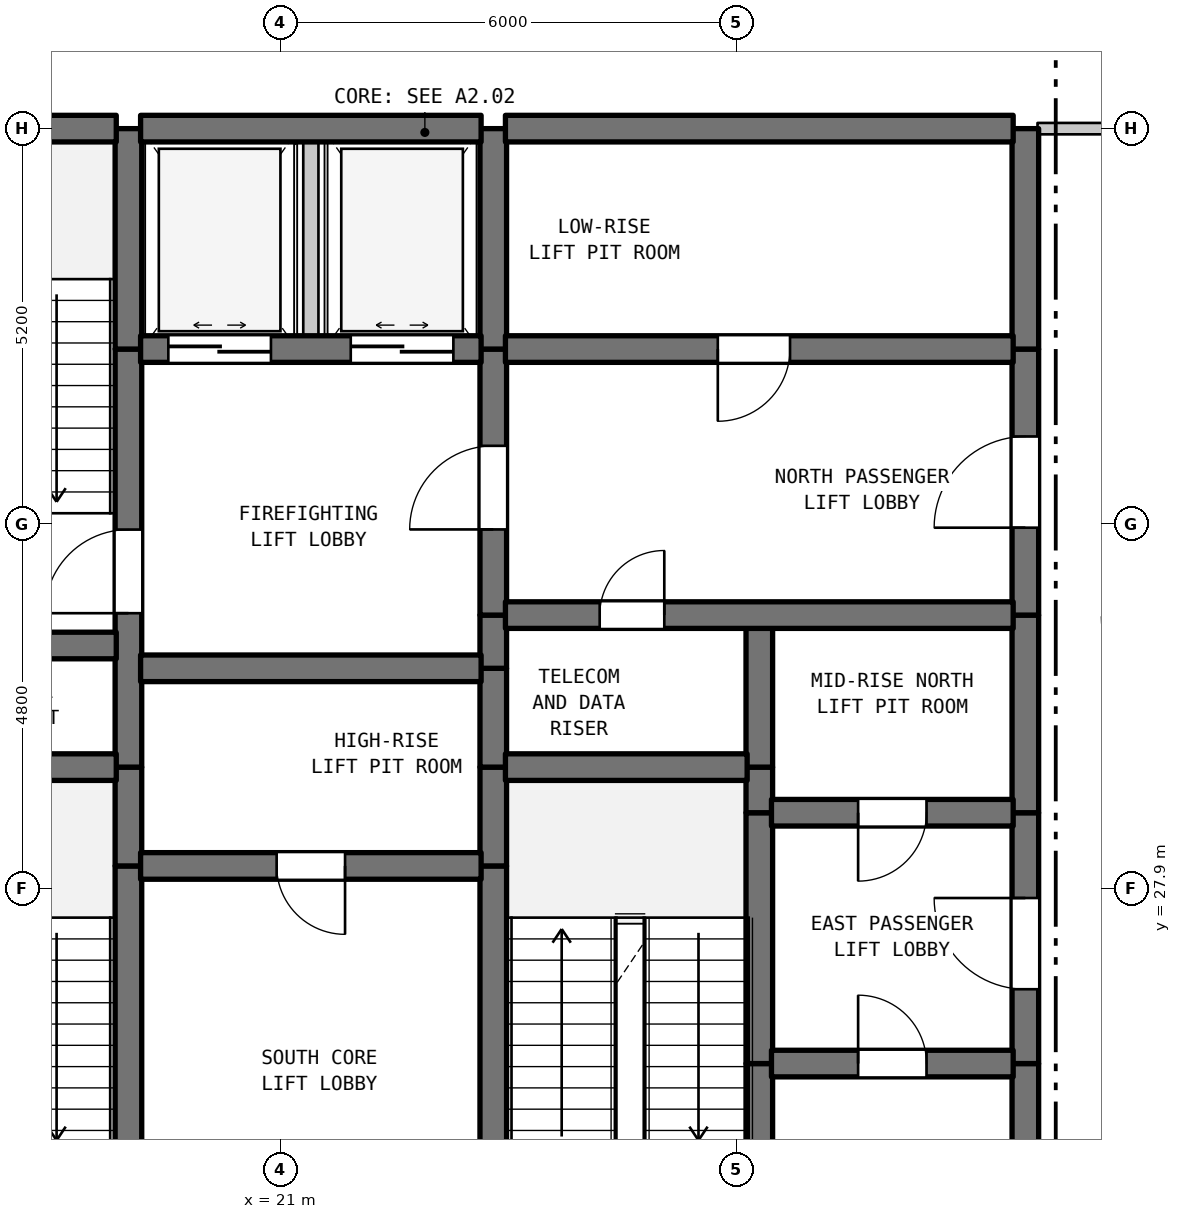
"""IFC4 building model, lengths in metres.
Left out: names, types, materials, properties, quantities, classifications, styles, units other than length and angle.
Written with IfcOpenShell. Run it as: python <this file> out.ifc"""

import sys

from ifc_helpers import new_model, si_unit, direction, frame, frame_2d, origin, place, context, subcontext, project, spatial, rectangle, extrude, element, fill, save


model = new_model("IFC4")
c1 = context("Model", 3, precision=1e-05, world=origin(), true_north=direction((0.0, 1.0)))
c2 = subcontext(c1, "Body", "Model", "MODEL_VIEW")
j1 = project(units=[si_unit("LENGTHUNIT", "METRE"), si_unit("PLANEANGLEUNIT", "RADIAN")], contexts=[c1])
p1 = place(None, origin())
s1 = spatial("IfcSite", under=j1, at=p1, CompositionType="ELEMENT")
p2 = place(p1, origin())
s2 = spatial("IfcBuilding", under=s1, at=p2, CompositionType="ELEMENT")
p3 = place(p2, frame((0.0, 0.0, -4.5)))
s3 = spatial("IfcBuildingStorey", under=s2, at=p3, CompositionType="ELEMENT", Elevation=-4.5)
p4 = place(p3, frame((19.0, 22.7, 0.0), z_axis=(0.0, 0.0, 1.0), x_axis=(0.0, 1.0, 0.0)))
e1 = element("IfcWall", 1, at=p4, inside=s3, PredefinedType="SHEAR", context=c2, shape_type="SweptSolid", body=[
    extrude(rectangle(XDim=5.5, YDim=0.35, at=frame_2d((2.75, 0.0))), origin(), (0.0, 0.0, 1.0), 4.1),
])
p5 = place(p4, frame((0.631, 0.0, 0.0)))
e2 = element("IfcOpeningElement", 2, at=p5, cuts=e1, PredefinedType="OPENING", context=c2, shape_type="SweptSolid", body=[
    extrude(rectangle(XDim=1.1, YDim=2.15, at=frame_2d((0.55, 1.075))), frame((0.0, 0.185, 0.0), z_axis=(0.0, -1.0, 0.0), x_axis=(1.0, 0.0, 0.0)), (0.0, 0.0, 1.0), 0.37),
])
p6 = place(p3, frame((19.0, 28.2, 0.0), z_axis=(0.0, 0.0, 1.0), x_axis=(0.0, 1.0, 0.0)))
e3 = element("IfcWall", 3, at=p6, inside=s3, PredefinedType="SHEAR", context=c2, shape_type="SweptSolid", body=[
    extrude(rectangle(XDim=1.3, YDim=0.35, at=frame_2d((0.65, 0.0))), origin(), (0.0, 0.0, 1.0), 4.1),
])
p7 = place(p3, frame((19.0, 29.5, 0.0), z_axis=(0.0, 0.0, 1.0), x_axis=(0.0, 1.0, 0.0)))
e4 = element("IfcWall", 4, at=p7, inside=s3, PredefinedType="SHEAR", context=c2, shape_type="SweptSolid", body=[
    extrude(rectangle(XDim=5.5, YDim=0.35, at=frame_2d((2.75, 0.0))), origin(), (0.0, 0.0, 1.0), 4.1),
])
p8 = place(p7, frame((2.025, 0.0, 0.0)))
e5 = element("IfcOpeningElement", 5, at=p8, cuts=e4, PredefinedType="OPENING", context=c2, shape_type="SweptSolid", body=[
    extrude(rectangle(XDim=1.1, YDim=2.15, at=frame_2d((0.55, 1.075))), frame((0.0, 0.185, 0.0), z_axis=(0.0, -1.0, 0.0), x_axis=(1.0, 0.0, 0.0)), (0.0, 0.0, 1.0), 0.37),
])
p9 = place(p3, frame((19.0, 35.0, 0.0), z_axis=(0.0, 0.0, 1.0), x_axis=(0.0, 1.0, 0.0)))
e6 = element("IfcWall", 6, at=p9, inside=s3, PredefinedType="SHEAR", context=c2, shape_type="SweptSolid", body=[
    extrude(rectangle(XDim=2.9, YDim=0.35, at=frame_2d((1.45, 0.0))), origin(), (0.0, 0.0, 1.0), 4.1),
])
p10 = place(p3, frame((21.4, 35.0, 0.0), z_axis=(0.0, 0.0, 1.0), x_axis=(0.0, 1.0, 0.0)))
e7 = element("IfcWall", 7, at=p10, inside=s3, PredefinedType="STANDARD", context=c2, shape_type="SweptSolid", body=[
    extrude(rectangle(XDim=2.9, YDim=0.2, at=frame_2d((1.45, 0.0))), origin(), (0.0, 0.0, 1.0), 4.1),
])
p11 = place(p3, frame((23.8, 22.7, 0.0), z_axis=(0.0, 0.0, 1.0), x_axis=(0.0, 1.0, 0.0)))
e8 = element("IfcWall", 8, at=p11, inside=s3, PredefinedType="SHEAR", context=c2, shape_type="SweptSolid", body=[
    extrude(rectangle(XDim=5.5, YDim=0.35, at=frame_2d((2.75, 0.0))), origin(), (0.0, 0.0, 1.0), 4.1),
])
p12 = place(p11, frame((0.235, 0.0, 0.0)))
e9 = element("IfcOpeningElement", 9, at=p12, cuts=e8, PredefinedType="OPENING", context=c2, shape_type="SweptSolid", body=[
    extrude(rectangle(XDim=1.1, YDim=2.15, at=frame_2d((0.55, 1.075))), frame((0.0, 0.185, 0.0), z_axis=(0.0, -1.0, 0.0), x_axis=(1.0, 0.0, 0.0)), (0.0, 0.0, 1.0), 0.37),
])
for number, where, z_axis, x_axis in (
    (10, (23.8, 28.2, 0.0), (0.0, 0.0, 1.0), (0.0, 1.0, 0.0)),
    (11, (23.8, 29.5, 0.0), (0.0, 0.0, 1.0), (0.0, 1.0, 0.0)),
):
    element("IfcWall", number, at=place(p3, frame(where, z_axis=z_axis, x_axis=x_axis)), inside=s3, PredefinedType="SHEAR", context=c2, shape_type="SweptSolid", body=[
        extrude(rectangle(XDim=1.3, YDim=0.35, at=frame_2d((0.65, 0.0))), origin(), (0.0, 0.0, 1.0), 4.1),
    ])
p13 = place(p3, frame((23.8, 30.8, 0.0), z_axis=(0.0, 0.0, 1.0), x_axis=(0.0, 1.0, 0.0)))
e12 = element("IfcWall", 12, at=p13, inside=s3, PredefinedType="SHEAR", context=c2, shape_type="SweptSolid", body=[
    extrude(rectangle(XDim=0.7, YDim=0.35, at=frame_2d((0.35, 0.0))), origin(), (0.0, 0.0, 1.0), 4.1),
])
p14 = place(p3, frame((23.8, 31.5, 0.0), z_axis=(0.0, 0.0, 1.0), x_axis=(0.0, 1.0, 0.0)))
e13 = element("IfcWall", 13, at=p14, inside=s3, PredefinedType="SHEAR", context=c2, shape_type="SweptSolid", body=[
    extrude(rectangle(XDim=3.5, YDim=0.35, at=frame_2d((1.75, 0.0))), origin(), (0.0, 0.0, 1.0), 4.1),
])
p15 = place(p14, frame((1.127, 0.0, 0.0)))
e14 = element("IfcOpeningElement", 14, at=p15, cuts=e13, PredefinedType="OPENING", context=c2, shape_type="SweptSolid", body=[
    extrude(rectangle(XDim=1.1, YDim=2.15, at=frame_2d((0.55, 1.075))), frame((0.0, 0.185, 0.0), z_axis=(0.0, -1.0, 0.0), x_axis=(1.0, 0.0, 0.0)), (0.0, 0.0, 1.0), 0.37),
])
p16 = place(p3, frame((23.8, 35.0, 0.0), z_axis=(0.0, 0.0, 1.0), x_axis=(0.0, 1.0, 0.0)))
e15 = element("IfcWall", 15, at=p16, inside=s3, PredefinedType="SHEAR", context=c2, shape_type="SweptSolid", body=[
    extrude(rectangle(XDim=2.9, YDim=0.35, at=frame_2d((1.45, 0.0))), origin(), (0.0, 0.0, 1.0), 4.1),
])
p17 = place(p3, frame((27.3, 22.7, 0.0), z_axis=(0.0, 0.0, 1.0), x_axis=(0.0, 1.0, 0.0)))
e16 = element("IfcWall", 16, at=p17, inside=s3, PredefinedType="SHEAR", context=c2, shape_type="SweptSolid", body=[
    extrude(rectangle(XDim=2.9, YDim=0.35, at=frame_2d((1.45, 0.0))), origin(), (0.0, 0.0, 1.0), 4.1),
])
p18 = place(p3, frame((27.3, 25.6, 0.0), z_axis=(0.0, 0.0, 1.0), x_axis=(0.0, 1.0, 0.0)))
e17 = element("IfcWall", 17, at=p18, inside=s3, PredefinedType="SHEAR", context=c2, shape_type="SweptSolid", body=[
    extrude(rectangle(XDim=3.3, YDim=0.35, at=frame_2d((1.65, 0.0))), origin(), (0.0, 0.0, 1.0), 4.1),
])
p19 = place(p3, frame((27.3, 28.9, 0.0), z_axis=(0.0, 0.0, 1.0), x_axis=(0.0, 1.0, 0.0)))
e18 = element("IfcWall", 18, at=p19, inside=s3, PredefinedType="SHEAR", context=c2, shape_type="SweptSolid", body=[
    extrude(rectangle(XDim=0.6, YDim=0.35, at=frame_2d((0.3, 0.0))), origin(), (0.0, 0.0, 1.0), 4.1),
])
p20 = place(p3, frame((27.3, 29.5, 0.0), z_axis=(0.0, 0.0, 1.0), x_axis=(0.0, 1.0, 0.0)))
e19 = element("IfcWall", 19, at=p20, inside=s3, PredefinedType="SHEAR", context=c2, shape_type="SweptSolid", body=[
    extrude(rectangle(XDim=2.0, YDim=0.35, at=frame_2d((1.0, 0.0))), origin(), (0.0, 0.0, 1.0), 4.1),
])
p21 = place(p3, frame((30.8, 22.7, 0.0), z_axis=(0.0, 0.0, 1.0), x_axis=(0.0, 1.0, 0.0)))
e20 = element("IfcWall", 20, at=p21, inside=s3, PredefinedType="SHEAR", context=c2, shape_type="SweptSolid", body=[
    extrude(rectangle(XDim=2.9, YDim=0.35, at=frame_2d((1.45, 0.0))), origin(), (0.0, 0.0, 1.0), 4.1),
])
p22 = place(p3, frame((30.8, 25.6, 0.0), z_axis=(0.0, 0.0, 1.0), x_axis=(0.0, 1.0, 0.0)))
e21 = element("IfcWall", 21, at=p22, inside=s3, PredefinedType="SHEAR", context=c2, shape_type="SweptSolid", body=[
    extrude(rectangle(XDim=3.3, YDim=0.35, at=frame_2d((1.65, 0.0))), origin(), (0.0, 0.0, 1.0), 4.1),
])
p23 = place(p22, frame((0.978, 0.0, 0.0)))
e22 = element("IfcOpeningElement", 22, at=p23, cuts=e21, PredefinedType="OPENING", context=c2, shape_type="SweptSolid", body=[
    extrude(rectangle(XDim=1.2, YDim=2.2, at=frame_2d((0.6, 1.1))), frame((0.0, 0.185, 0.0), z_axis=(0.0, -1.0, 0.0), x_axis=(1.0, 0.0, 0.0)), (0.0, 0.0, 1.0), 0.37),
])
p24 = place(p3, frame((30.8, 28.9, 0.0), z_axis=(0.0, 0.0, 1.0), x_axis=(0.0, 1.0, 0.0)))
e23 = element("IfcWall", 23, at=p24, inside=s3, PredefinedType="SHEAR", context=c2, shape_type="SweptSolid", body=[
    extrude(rectangle(XDim=2.6, YDim=0.35, at=frame_2d((1.3, 0.0))), origin(), (0.0, 0.0, 1.0), 4.1),
])
p25 = place(p3, frame((30.8, 31.5, 0.0), z_axis=(0.0, 0.0, 1.0), x_axis=(0.0, 1.0, 0.0)))
e24 = element("IfcWall", 24, at=p25, inside=s3, PredefinedType="SHEAR", context=c2, shape_type="SweptSolid", body=[
    extrude(rectangle(XDim=3.5, YDim=0.35, at=frame_2d((1.75, 0.0))), origin(), (0.0, 0.0, 1.0), 4.1),
])
p26 = place(p25, frame((1.15, 0.0, 0.0)))
e25 = element("IfcOpeningElement", 25, at=p26, cuts=e24, PredefinedType="OPENING", context=c2, shape_type="SweptSolid", body=[
    extrude(rectangle(XDim=1.2, YDim=2.2, at=frame_2d((0.6, 1.1))), frame((0.0, 0.185, 0.0), z_axis=(0.0, -1.0, 0.0), x_axis=(1.0, 0.0, 0.0)), (0.0, 0.0, 1.0), 0.37),
])
p27 = place(p3, frame((30.8, 35.0, 0.0), z_axis=(0.0, 0.0, 1.0), x_axis=(0.0, 1.0, 0.0)))
e26 = element("IfcWall", 26, at=p27, inside=s3, PredefinedType="SHEAR", context=c2, shape_type="SweptSolid", body=[
    extrude(rectangle(XDim=2.9, YDim=0.35, at=frame_2d((1.45, 0.0))), origin(), (0.0, 0.0, 1.0), 4.1),
])
p28 = place(p3, frame((27.46, 25.6, 0.0), z_axis=(0.0, 0.0, 1.0), x_axis=(1.0, 0.0, 0.0)))
e27 = element("IfcWall", 27, at=p28, inside=s3, PredefinedType="SHEAR", context=c2, shape_type="SweptSolid", body=[
    extrude(rectangle(XDim=3.18, YDim=0.35, at=frame_2d((1.59, 0.0))), origin(), (0.0, 0.0, 1.0), 4.1),
])
p29 = place(p28, frame((1.14, 0.0, 0.0)))
e28 = element("IfcOpeningElement", 28, at=p29, cuts=e27, PredefinedType="OPENING", context=c2, shape_type="SweptSolid", body=[
    extrude(rectangle(XDim=0.9, YDim=2.15, at=frame_2d((0.45, 1.075))), frame((0.0, 0.185, 0.0), z_axis=(0.0, -1.0, 0.0), x_axis=(1.0, 0.0, 0.0)), (0.0, 0.0, 1.0), 0.37),
])
p30 = place(p3, frame((19.16, 28.2, 0.0), z_axis=(0.0, 0.0, 1.0), x_axis=(1.0, 0.0, 0.0)))
e29 = element("IfcWall", 29, at=p30, inside=s3, PredefinedType="SHEAR", context=c2, shape_type="SweptSolid", body=[
    extrude(rectangle(XDim=4.48, YDim=0.35, at=frame_2d((2.24, 0.0))), origin(), (0.0, 0.0, 1.0), 4.1),
])
p31 = place(p30, frame((1.79, 0.0, 0.0)))
e30 = element("IfcOpeningElement", 30, at=p31, cuts=e29, PredefinedType="OPENING", context=c2, shape_type="SweptSolid", body=[
    extrude(rectangle(XDim=0.9, YDim=2.15, at=frame_2d((0.45, 1.075))), frame((0.0, 0.185, 0.0), z_axis=(0.0, -1.0, 0.0), x_axis=(1.0, 0.0, 0.0)), (0.0, 0.0, 1.0), 0.37),
])
p32 = place(p3, frame((27.46, 28.9, 0.0), z_axis=(0.0, 0.0, 1.0), x_axis=(1.0, 0.0, 0.0)))
e31 = element("IfcWall", 31, at=p32, inside=s3, PredefinedType="SHEAR", context=c2, shape_type="SweptSolid", body=[
    extrude(rectangle(XDim=3.18, YDim=0.35, at=frame_2d((1.59, 0.0))), origin(), (0.0, 0.0, 1.0), 4.1),
])
p33 = place(p32, frame((1.14, 0.0, 0.0)))
e32 = element("IfcOpeningElement", 32, at=p33, cuts=e31, PredefinedType="OPENING", context=c2, shape_type="SweptSolid", body=[
    extrude(rectangle(XDim=0.9, YDim=2.15, at=frame_2d((0.45, 1.075))), frame((0.0, 0.185, 0.0), z_axis=(0.0, -1.0, 0.0), x_axis=(1.0, 0.0, 0.0)), (0.0, 0.0, 1.0), 0.37),
])
p34 = place(p3, frame((15.16, 29.5, 0.0), z_axis=(0.0, 0.0, 1.0), x_axis=(1.0, 0.0, 0.0)))
e33 = element("IfcWall", 33, at=p34, inside=s3, PredefinedType="SHEAR", context=c2, shape_type="SweptSolid", body=[
    extrude(rectangle(XDim=3.68, YDim=0.35, at=frame_2d((1.84, 0.0))), origin(), (0.0, 0.0, 1.0), 4.1),
])
p35 = place(p3, frame((23.96, 29.5, 0.0), z_axis=(0.0, 0.0, 1.0), x_axis=(1.0, 0.0, 0.0)))
e34 = element("IfcWall", 34, at=p35, inside=s3, PredefinedType="SHEAR", context=c2, shape_type="SweptSolid", body=[
    extrude(rectangle(XDim=3.18, YDim=0.35, at=frame_2d((1.59, 0.0))), origin(), (0.0, 0.0, 1.0), 4.1),
])
p36 = place(p3, frame((19.16, 30.8, 0.0), z_axis=(0.0, 0.0, 1.0), x_axis=(1.0, 0.0, 0.0)))
e35 = element("IfcWall", 35, at=p36, inside=s3, PredefinedType="SHEAR", context=c2, shape_type="SweptSolid", body=[
    extrude(rectangle(XDim=4.48, YDim=0.35, at=frame_2d((2.24, 0.0))), origin(), (0.0, 0.0, 1.0), 4.1),
])
p37 = place(p3, frame((15.16, 31.1, 0.0), z_axis=(0.0, 0.0, 1.0), x_axis=(1.0, 0.0, 0.0)))
e36 = element("IfcWall", 36, at=p37, inside=s3, PredefinedType="SHEAR", context=c2, shape_type="SweptSolid", body=[
    extrude(rectangle(XDim=3.68, YDim=0.35, at=frame_2d((1.84, 0.0))), origin(), (0.0, 0.0, 1.0), 4.1),
])
p38 = place(p3, frame((23.96, 31.5, 0.0), z_axis=(0.0, 0.0, 1.0), x_axis=(1.0, 0.0, 0.0)))
e37 = element("IfcWall", 37, at=p38, inside=s3, PredefinedType="SHEAR", context=c2, shape_type="SweptSolid", body=[
    extrude(rectangle(XDim=6.68, YDim=0.35, at=frame_2d((3.34, 0.0))), origin(), (0.0, 0.0, 1.0), 4.1),
])
p39 = place(p38, frame((1.24, 0.0, 0.0)))
e38 = element("IfcOpeningElement", 38, at=p39, cuts=e37, PredefinedType="OPENING", context=c2, shape_type="SweptSolid", body=[
    extrude(rectangle(XDim=0.85, YDim=2.1, at=frame_2d((0.425, 1.05))), frame((0.0, 0.185, 0.0), z_axis=(0.0, -1.0, 0.0), x_axis=(1.0, 0.0, 0.0)), (0.0, 0.0, 1.0), 0.37),
])
p40 = place(p3, frame((19.16, 35.0, 0.0), z_axis=(0.0, 0.0, 1.0), x_axis=(1.0, 0.0, 0.0)))
e39 = element("IfcWall", 39, at=p40, inside=s3, PredefinedType="SHEAR", context=c2, shape_type="SweptSolid", body=[
    extrude(rectangle(XDim=4.48, YDim=0.35, at=frame_2d((2.24, 0.0))), origin(), (0.0, 0.0, 1.0), 4.1),
])
p41 = place(p40, frame((0.365, 0.0, 0.0)))
e40 = element("IfcOpeningElement", 40, at=p41, cuts=e39, PredefinedType="OPENING", context=c2, shape_type="SweptSolid", body=[
    extrude(rectangle(XDim=1.35, YDim=2.2, at=frame_2d((0.675, 1.1))), frame((0.0, 0.185, 0.0), z_axis=(0.0, -1.0, 0.0), x_axis=(1.0, 0.0, 0.0)), (0.0, 0.0, 1.0), 0.37),
])
p42 = place(p40, frame((2.765, 0.0, 0.0)))
e41 = element("IfcOpeningElement", 41, at=p42, cuts=e39, PredefinedType="OPENING", context=c2, shape_type="SweptSolid", body=[
    extrude(rectangle(XDim=1.35, YDim=2.2, at=frame_2d((0.675, 1.1))), frame((0.0, 0.185, 0.0), z_axis=(0.0, -1.0, 0.0), x_axis=(1.0, 0.0, 0.0)), (0.0, 0.0, 1.0), 0.37),
])
p43 = place(p3, frame((23.96, 35.0, 0.0), z_axis=(0.0, 0.0, 1.0), x_axis=(1.0, 0.0, 0.0)))
e42 = element("IfcWall", 42, at=p43, inside=s3, PredefinedType="SHEAR", context=c2, shape_type="SweptSolid", body=[
    extrude(rectangle(XDim=6.68, YDim=0.35, at=frame_2d((3.34, 0.0))), origin(), (0.0, 0.0, 1.0), 4.1),
])
p44 = place(p43, frame((2.794, 0.0, 0.0)))
e43 = element("IfcOpeningElement", 43, at=p44, cuts=e42, PredefinedType="OPENING", context=c2, shape_type="SweptSolid", body=[
    extrude(rectangle(XDim=0.95, YDim=2.15, at=frame_2d((0.475, 1.075))), frame((0.0, 0.185, 0.0), z_axis=(0.0, -1.0, 0.0), x_axis=(1.0, 0.0, 0.0)), (0.0, 0.0, 1.0), 0.37),
])
p45 = place(p3, frame((15.16, 37.9, 0.0), z_axis=(0.0, 0.0, 1.0), x_axis=(1.0, 0.0, 0.0)))
e44 = element("IfcWall", 44, at=p45, inside=s3, PredefinedType="SHEAR", context=c2, shape_type="SweptSolid", body=[
    extrude(rectangle(XDim=3.68, YDim=0.35, at=frame_2d((1.84, 0.0))), origin(), (0.0, 0.0, 1.0), 4.1),
])
p46 = place(p3, frame((19.16, 37.9, 0.0), z_axis=(0.0, 0.0, 1.0), x_axis=(1.0, 0.0, 0.0)))
e45 = element("IfcWall", 45, at=p46, inside=s3, PredefinedType="SHEAR", context=c2, shape_type="SweptSolid", body=[
    extrude(rectangle(XDim=4.48, YDim=0.35, at=frame_2d((2.24, 0.0))), origin(), (0.0, 0.0, 1.0), 4.1),
])
p47 = place(p3, frame((23.96, 37.9, 0.0), z_axis=(0.0, 0.0, 1.0), x_axis=(1.0, 0.0, 0.0)))
e46 = element("IfcWall", 46, at=p47, inside=s3, PredefinedType="SHEAR", context=c2, shape_type="SweptSolid", body=[
    extrude(rectangle(XDim=6.68, YDim=0.35, at=frame_2d((3.34, 0.0))), origin(), (0.0, 0.0, 1.0), 4.1),
])
p48 = place(p3, frame((30.96, 37.9, 0.0), z_axis=(0.0, 0.0, 1.0), x_axis=(1.0, 0.0, 0.0)))
e47 = element("IfcWall", 47, at=p48, inside=s3, PredefinedType="STANDARD", context=c2, shape_type="SweptSolid", body=[
    extrude(rectangle(XDim=1.98, YDim=0.15, at=frame_2d((0.99, 0.0))), origin(), (0.0, 0.0, 1.0), 3.2),
])
p49 = place(p8, origin())
e48 = element("IfcDoor", 48, at=p49, inside=s3, OperationType="SINGLE_SWING_LEFT", PredefinedType="DOOR", context=c2, shape_type="SweptSolid", body=[
    extrude(rectangle(XDim=1.1, YDim=2.15, at=frame_2d((0.55, 1.075))), frame((0.0, 0.025, 0.0), z_axis=(0.0, -1.0, 0.0), x_axis=(1.0, 0.0, 0.0)), (0.0, 0.0, 1.0), 0.05),
])
fill(e5, e48)
p50 = place(p15, origin())
e49 = element("IfcDoor", 49, at=p50, inside=s3, OperationType="SINGLE_SWING_LEFT", PredefinedType="DOOR", context=c2, shape_type="SweptSolid", body=[
    extrude(rectangle(XDim=1.1, YDim=2.15, at=frame_2d((0.55, 1.075))), frame((0.0, 0.025, 0.0), z_axis=(0.0, -1.0, 0.0), x_axis=(1.0, 0.0, 0.0)), (0.0, 0.0, 1.0), 0.05),
])
fill(e14, e49)
p51 = place(p23, origin())
e50 = element("IfcDoor", 50, at=p51, inside=s3, OperationType="SINGLE_SWING_RIGHT", PredefinedType="DOOR", context=c2, shape_type="SweptSolid", body=[
    extrude(rectangle(XDim=1.2, YDim=2.2, at=frame_2d((0.6, 1.1))), frame((0.0, 0.025, 0.0), z_axis=(0.0, -1.0, 0.0), x_axis=(1.0, 0.0, 0.0)), (0.0, 0.0, 1.0), 0.05),
])
fill(e22, e50)
p52 = place(p26, origin())
e51 = element("IfcDoor", 51, at=p52, inside=s3, OperationType="SINGLE_SWING_LEFT", PredefinedType="DOOR", context=c2, shape_type="SweptSolid", body=[
    extrude(rectangle(XDim=1.2, YDim=2.2, at=frame_2d((0.6, 1.1))), frame((0.0, 0.025, 0.0), z_axis=(0.0, -1.0, 0.0), x_axis=(1.0, 0.0, 0.0)), (0.0, 0.0, 1.0), 0.05),
])
fill(e25, e51)
p53 = place(p29, origin())
e52 = element("IfcDoor", 52, at=p53, inside=s3, OperationType="SINGLE_SWING_LEFT", PredefinedType="DOOR", context=c2, shape_type="SweptSolid", body=[
    extrude(rectangle(XDim=0.9, YDim=2.15, at=frame_2d((0.45, 1.075))), frame((0.0, 0.025, 0.0), z_axis=(0.0, -1.0, 0.0), x_axis=(1.0, 0.0, 0.0)), (0.0, 0.0, 1.0), 0.05),
])
fill(e28, e52)
p54 = place(p31, frame((0.9, 0.0, 0.0), z_axis=(0.0, 0.0, 1.0), x_axis=(-1.0, 0.0, 0.0)))
e53 = element("IfcDoor", 53, at=p54, inside=s3, OperationType="SINGLE_SWING_RIGHT", PredefinedType="DOOR", context=c2, shape_type="SweptSolid", body=[
    extrude(rectangle(XDim=0.9, YDim=2.15, at=frame_2d((0.45, 1.075))), frame((0.0, 0.025, 0.0), z_axis=(0.0, -1.0, 0.0), x_axis=(1.0, 0.0, 0.0)), (0.0, 0.0, 1.0), 0.05),
])
fill(e30, e53)
p55 = place(p33, frame((0.9, 0.0, 0.0), z_axis=(0.0, 0.0, 1.0), x_axis=(-1.0, 0.0, 0.0)))
e54 = element("IfcDoor", 54, at=p55, inside=s3, OperationType="SINGLE_SWING_LEFT", PredefinedType="DOOR", context=c2, shape_type="SweptSolid", body=[
    extrude(rectangle(XDim=0.9, YDim=2.15, at=frame_2d((0.45, 1.075))), frame((0.0, 0.025, 0.0), z_axis=(0.0, -1.0, 0.0), x_axis=(1.0, 0.0, 0.0)), (0.0, 0.0, 1.0), 0.05),
])
fill(e32, e54)
p56 = place(p39, origin())
e55 = element("IfcDoor", 55, at=p56, inside=s3, OperationType="SINGLE_SWING_RIGHT", PredefinedType="DOOR", context=c2, shape_type="SweptSolid", body=[
    extrude(rectangle(XDim=0.85, YDim=2.1, at=frame_2d((0.425, 1.05))), frame((0.0, 0.025, 0.0), z_axis=(0.0, -1.0, 0.0), x_axis=(1.0, 0.0, 0.0)), (0.0, 0.0, 1.0), 0.05),
])
fill(e38, e55)
p57 = place(p41, origin())
e56 = element("IfcDoor", 56, at=p57, inside=s3, OperationType="DOUBLE_DOOR_SLIDING", PredefinedType="DOOR", context=c2, shape_type="SweptSolid", body=[
    extrude(rectangle(XDim=1.35, YDim=2.2, at=frame_2d((0.675, 1.1))), frame((0.0, 0.025, 0.0), z_axis=(0.0, -1.0, 0.0), x_axis=(1.0, 0.0, 0.0)), (0.0, 0.0, 1.0), 0.05),
])
fill(e40, e56)
p58 = place(p42, origin())
e57 = element("IfcDoor", 57, at=p58, inside=s3, OperationType="DOUBLE_DOOR_SLIDING", PredefinedType="DOOR", context=c2, shape_type="SweptSolid", body=[
    extrude(rectangle(XDim=1.35, YDim=2.2, at=frame_2d((0.675, 1.1))), frame((0.0, 0.025, 0.0), z_axis=(0.0, -1.0, 0.0), x_axis=(1.0, 0.0, 0.0)), (0.0, 0.0, 1.0), 0.05),
])
fill(e41, e57)
p59 = place(p44, frame((0.95, 0.0, 0.0), z_axis=(0.0, 0.0, 1.0), x_axis=(-1.0, 0.0, 0.0)))
e58 = element("IfcDoor", 58, at=p59, inside=s3, OperationType="SINGLE_SWING_LEFT", PredefinedType="DOOR", context=c2, shape_type="SweptSolid", body=[
    extrude(rectangle(XDim=0.95, YDim=2.15, at=frame_2d((0.475, 1.075))), frame((0.0, 0.025, 0.0), z_axis=(0.0, -1.0, 0.0), x_axis=(1.0, 0.0, 0.0)), (0.0, 0.0, 1.0), 0.05),
])
fill(e43, e58)
save(model, sys.argv[1])
